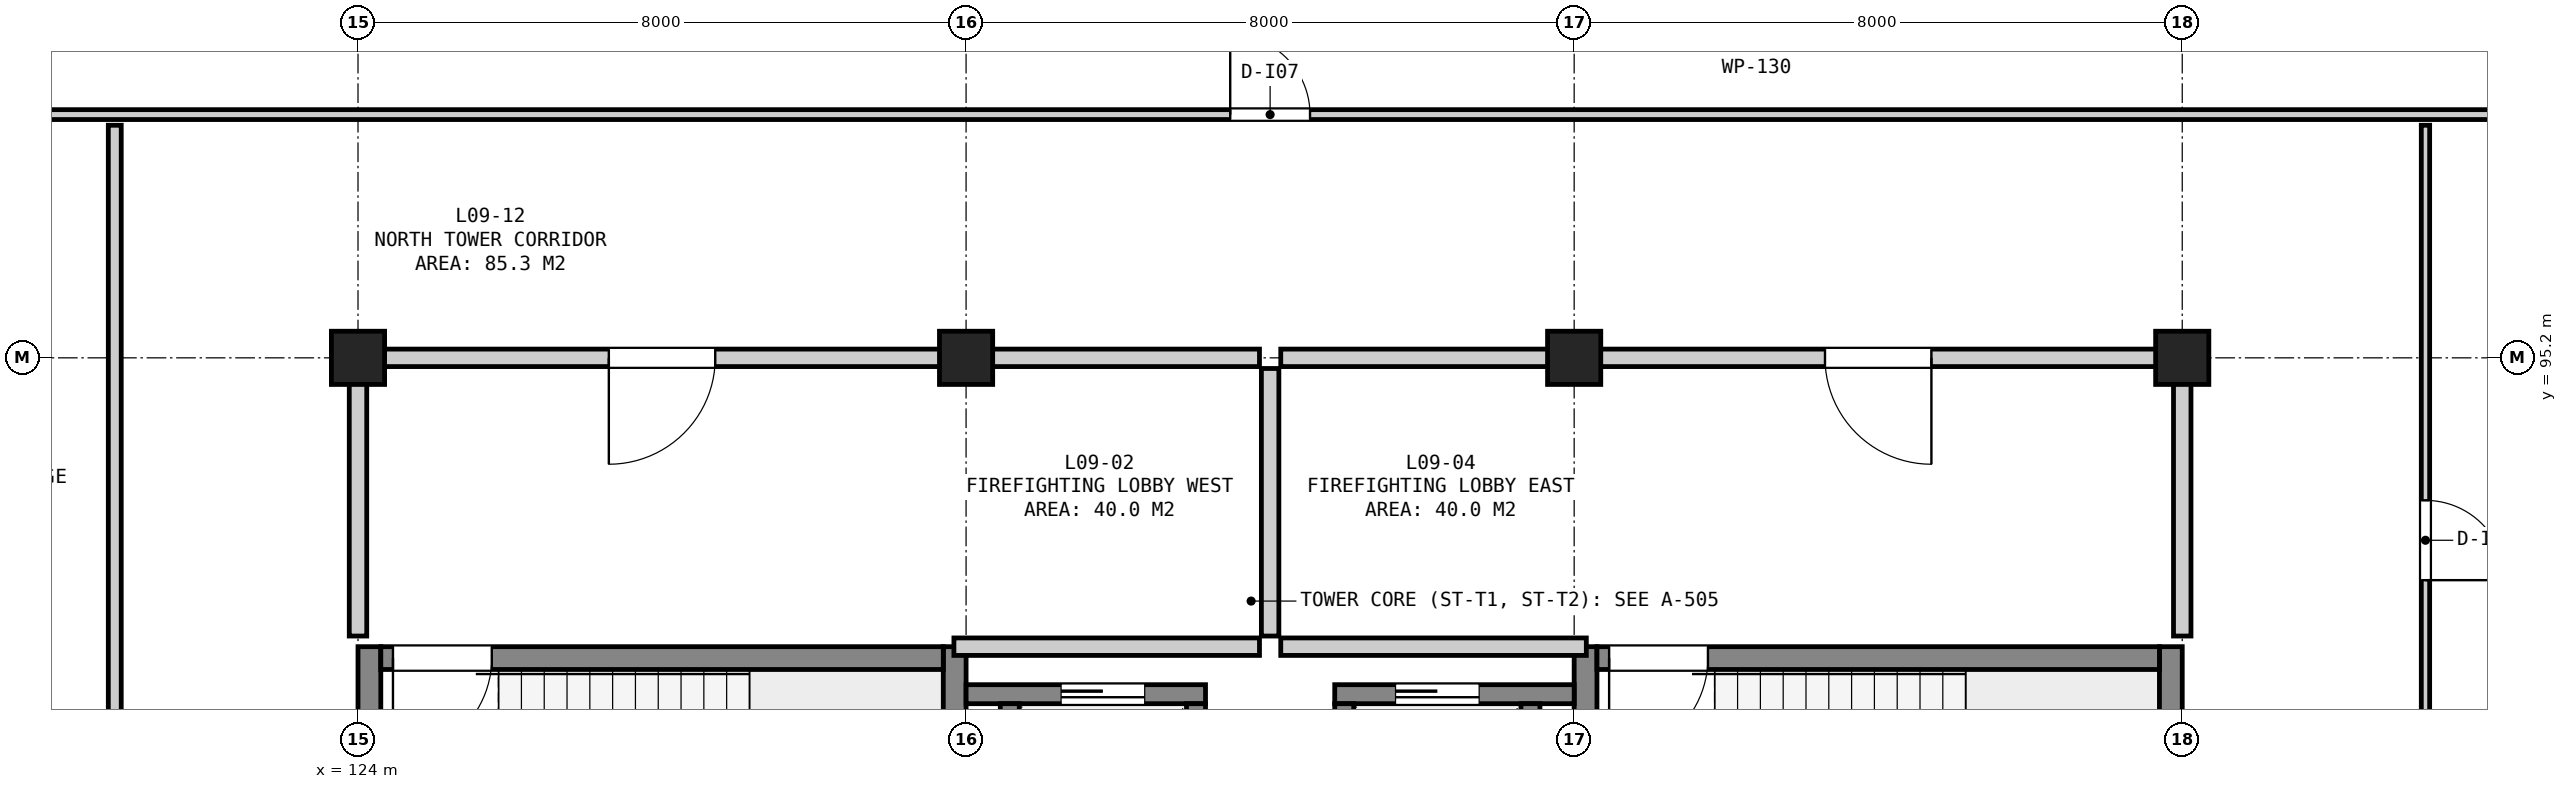
"""IFC4 building model, lengths in metres.
Left out: names, types, materials, properties, quantities, classifications, styles, units other than length and angle.
Written with IfcOpenShell. Run it as: python <this file> out.ifc"""

import sys

from ifc_helpers import new_model, si_unit, direction, frame, frame_2d, origin, origin_2d, place, context, subcontext, project, spatial, rectangle, extrude, element, fill, save


model = new_model("IFC4")
c1 = context("Model", 3, precision=1e-05, world=origin(), true_north=direction((0.0, 1.0)))
c2 = subcontext(c1, "Body", "Model", "MODEL_VIEW")
j1 = project(units=[si_unit("LENGTHUNIT", "METRE"), si_unit("PLANEANGLEUNIT", "RADIAN")], contexts=[c1])
p1 = place(None, origin())
s1 = spatial("IfcSite", under=j1, at=p1, CompositionType="ELEMENT")
p2 = place(p1, origin())
s2 = spatial("IfcBuilding", under=s1, at=p2, CompositionType="ELEMENT")
p3 = place(p2, frame((0.0, 0.0, 39.5)))
s3 = spatial("IfcBuildingStorey", under=s2, at=p3, CompositionType="ELEMENT", Elevation=39.5)
for number, where, z_axis, x_axis in (
    (1, (124.0, 95.2, 0.0), (0.0, 0.0, 1.0), (1.0, 0.0, 0.0)),
    (2, (132.0, 95.2, 0.0), (0.0, 0.0, 1.0), (1.0, 0.0, 0.0)),
    (3, (140.0, 95.2, 0.0), (0.0, 0.0, 1.0), (1.0, 0.0, 0.0)),
    (4, (148.0, 95.2, 0.0), (0.0, 0.0, 1.0), (1.0, 0.0, 0.0)),
):
    element("IfcColumn", number, at=place(p3, frame(where, z_axis=z_axis, x_axis=x_axis)), inside=s3, PredefinedType="COLUMN", context=c2, shape_type="SweptSolid", body=[
        extrude(rectangle(XDim=0.7, YDim=0.7, at=origin_2d()), origin(), (0.0, 0.0, 1.0), 3.8),
    ])
for number, where, z_axis, x_axis in (
    (5, (124.15, 87.2, 0.0), (0.0, 0.0, 1.0), (0.0, 1.0, 0.0)),
    (6, (131.85, 87.2, 0.0), (0.0, 0.0, 1.0), (0.0, 1.0, 0.0)),
):
    element("IfcWall", number, at=place(p3, frame(where, z_axis=z_axis, x_axis=x_axis)), inside=s3, PredefinedType="SHEAR", context=c2, shape_type="SweptSolid", body=[
        extrude(rectangle(XDim=4.2, YDim=0.3, at=frame_2d((2.1, 0.0))), origin(), (0.0, 0.0, 1.0), 3.52),
    ])
p4 = place(p3, frame((124.3, 91.25, 0.0), z_axis=(0.0, 0.0, 1.0), x_axis=(1.0, 0.0, 0.0)))
e7 = element("IfcWall", 7, at=p4, inside=s3, PredefinedType="SHEAR", context=c2, shape_type="SweptSolid", body=[
    extrude(rectangle(XDim=7.4, YDim=0.3, at=frame_2d((3.7, 0.0))), origin(), (0.0, 0.0, 1.0), 3.52),
])
p5 = place(p4, frame((0.16, 0.0, 0.0)))
e8 = element("IfcOpeningElement", 8, at=p5, cuts=e7, PredefinedType="OPENING", context=c2, shape_type="SweptSolid", body=[
    extrude(rectangle(XDim=1.3, YDim=2.18, at=frame_2d((0.65, 1.09))), frame((0.0, 0.162, 0.0), z_axis=(0.0, -1.0, 0.0), x_axis=(1.0, 0.0, 0.0)), (0.0, 0.0, 1.0), 0.324),
])
for number, where, z_axis, x_axis in (
    (9, (140.15, 87.2, 0.0), (0.0, 0.0, 1.0), (0.0, 1.0, 0.0)),
    (10, (147.85, 87.2, 0.0), (0.0, 0.0, 1.0), (0.0, 1.0, 0.0)),
):
    element("IfcWall", number, at=place(p3, frame(where, z_axis=z_axis, x_axis=x_axis)), inside=s3, PredefinedType="SHEAR", context=c2, shape_type="SweptSolid", body=[
        extrude(rectangle(XDim=4.2, YDim=0.3, at=frame_2d((2.1, 0.0))), origin(), (0.0, 0.0, 1.0), 3.52),
    ])
p6 = place(p3, frame((140.3, 91.25, 0.0), z_axis=(0.0, 0.0, 1.0), x_axis=(1.0, 0.0, 0.0)))
e11 = element("IfcWall", 11, at=p6, inside=s3, PredefinedType="SHEAR", context=c2, shape_type="SweptSolid", body=[
    extrude(rectangle(XDim=7.4, YDim=0.3, at=frame_2d((3.7, 0.0))), origin(), (0.0, 0.0, 1.0), 3.52),
])
p7 = place(p6, frame((0.16, 0.0, 0.0)))
e12 = element("IfcOpeningElement", 12, at=p7, cuts=e11, PredefinedType="OPENING", context=c2, shape_type="SweptSolid", body=[
    extrude(rectangle(XDim=1.3, YDim=2.18, at=frame_2d((0.65, 1.09))), frame((0.0, 0.162, 0.0), z_axis=(0.0, -1.0, 0.0), x_axis=(1.0, 0.0, 0.0)), (0.0, 0.0, 1.0), 0.324),
])
p8 = place(p3, frame((132.0, 90.775, 0.0), z_axis=(0.0, 0.0, 1.0), x_axis=(1.0, 0.0, 0.0)))
e13 = element("IfcWall", 13, at=p8, inside=s3, PredefinedType="SHEAR", context=c2, shape_type="SweptSolid", body=[
    extrude(rectangle(XDim=3.15, YDim=0.25, at=frame_2d((1.575, 0.0))), origin(), (0.0, 0.0, 1.0), 3.52),
])
p9 = place(p8, frame((1.25, 0.0, 0.0)))
e14 = element("IfcOpeningElement", 14, at=p9, cuts=e13, PredefinedType="OPENING", context=c2, shape_type="SweptSolid", body=[
    extrude(rectangle(XDim=1.1, YDim=2.15, at=frame_2d((0.55, 1.075))), frame((0.0, 0.137, 0.0), z_axis=(0.0, -1.0, 0.0), x_axis=(1.0, 0.0, 0.0)), (0.0, 0.0, 1.0), 0.274),
])
for number, where, z_axis, x_axis in (
    (15, (132.575, 87.75, 0.0), (0.0, 0.0, 1.0), (0.0, 1.0, 0.0)),
    (16, (135.025, 87.75, 0.0), (0.0, 0.0, 1.0), (0.0, 1.0, 0.0)),
):
    element("IfcWall", number, at=place(p3, frame(where, z_axis=z_axis, x_axis=x_axis)), inside=s3, PredefinedType="SHEAR", context=c2, shape_type="SweptSolid", body=[
        extrude(rectangle(XDim=2.9, YDim=0.25, at=frame_2d((1.45, 0.0))), origin(), (0.0, 0.0, 1.0), 3.52),
    ])
p10 = place(p3, frame((136.85, 90.775, 0.0), z_axis=(0.0, 0.0, 1.0), x_axis=(1.0, 0.0, 0.0)))
e17 = element("IfcWall", 17, at=p10, inside=s3, PredefinedType="SHEAR", context=c2, shape_type="SweptSolid", body=[
    extrude(rectangle(XDim=3.15, YDim=0.25, at=frame_2d((1.575, 0.0))), origin(), (0.0, 0.0, 1.0), 3.52),
])
p11 = place(p10, frame((0.8, 0.0, 0.0)))
e18 = element("IfcOpeningElement", 18, at=p11, cuts=e17, PredefinedType="OPENING", context=c2, shape_type="SweptSolid", body=[
    extrude(rectangle(XDim=1.1, YDim=2.15, at=frame_2d((0.55, 1.075))), frame((0.0, 0.137, 0.0), z_axis=(0.0, -1.0, 0.0), x_axis=(1.0, 0.0, 0.0)), (0.0, 0.0, 1.0), 0.274),
])
for number, where, z_axis, x_axis in (
    (19, (136.975, 87.75, 0.0), (0.0, 0.0, 1.0), (0.0, 1.0, 0.0)),
    (20, (139.425, 87.75, 0.0), (0.0, 0.0, 1.0), (0.0, 1.0, 0.0)),
):
    element("IfcWall", number, at=place(p3, frame(where, z_axis=z_axis, x_axis=x_axis)), inside=s3, PredefinedType="SHEAR", context=c2, shape_type="SweptSolid", body=[
        extrude(rectangle(XDim=2.9, YDim=0.25, at=frame_2d((1.45, 0.0))), origin(), (0.0, 0.0, 1.0), 3.52),
    ])
p12 = place(p3, frame((131.84, 91.4, 0.0), z_axis=(0.0, 0.0, 1.0), x_axis=(1.0, 0.0, 0.0)))
e21 = element("IfcWall", 21, at=p12, inside=s3, PredefinedType="SOLIDWALL", context=c2, shape_type="SweptSolid", body=[
    extrude(rectangle(XDim=4.02, YDim=0.23, at=frame_2d((2.01, 0.0))), origin(), (0.0, 0.0, 1.0), 3.52),
])
p13 = place(p3, frame((124.14, 95.2, 0.0), z_axis=(0.0, 0.0, 1.0), x_axis=(1.0, 0.0, 0.0)))
e22 = element("IfcWall", 22, at=p13, inside=s3, PredefinedType="SOLIDWALL", context=c2, shape_type="SweptSolid", body=[
    extrude(rectangle(XDim=11.72, YDim=0.23, at=frame_2d((5.86, 0.0))), origin(), (0.0, 0.0, 1.0), 2.985),
])
p14 = place(p13, frame((3.16, 0.0, 0.0)))
e23 = element("IfcOpeningElement", 23, at=p14, cuts=e22, PredefinedType="OPENING", context=c2, shape_type="SweptSolid", body=[
    extrude(rectangle(XDim=1.4, YDim=2.2, at=frame_2d((0.7, 1.1))), frame((0.0, 0.127, 0.0), z_axis=(0.0, -1.0, 0.0), x_axis=(1.0, 0.0, 0.0)), (0.0, 0.0, 1.0), 0.254),
])
p15 = place(p3, frame((124.0, 91.54, 0.0), z_axis=(0.0, 0.0, 1.0), x_axis=(0.0, 1.0, 0.0)))
e24 = element("IfcWall", 24, at=p15, inside=s3, PredefinedType="SOLIDWALL", context=c2, shape_type="SweptSolid", body=[
    extrude(rectangle(XDim=3.52, YDim=0.23, at=frame_2d((1.76, 0.0))), origin(), (0.0, 0.0, 1.0), 3.085),
])
p16 = place(p3, frame((136.0, 91.54, 0.0), z_axis=(0.0, 0.0, 1.0), x_axis=(0.0, 1.0, 0.0)))
e25 = element("IfcWall", 25, at=p16, inside=s3, PredefinedType="SOLIDWALL", context=c2, shape_type="SweptSolid", body=[
    extrude(rectangle(XDim=3.52, YDim=0.23, at=frame_2d((1.76, 0.0))), origin(), (0.0, 0.0, 1.0), 3.52),
])
p17 = place(p3, frame((136.14, 91.4, 0.0), z_axis=(0.0, 0.0, 1.0), x_axis=(1.0, 0.0, 0.0)))
e26 = element("IfcWall", 26, at=p17, inside=s3, PredefinedType="SOLIDWALL", context=c2, shape_type="SweptSolid", body=[
    extrude(rectangle(XDim=4.02, YDim=0.23, at=frame_2d((2.01, 0.0))), origin(), (0.0, 0.0, 1.0), 3.52),
])
p18 = place(p3, frame((136.14, 95.2, 0.0), z_axis=(0.0, 0.0, 1.0), x_axis=(1.0, 0.0, 0.0)))
e27 = element("IfcWall", 27, at=p18, inside=s3, PredefinedType="SOLIDWALL", context=c2, shape_type="SweptSolid", body=[
    extrude(rectangle(XDim=11.72, YDim=0.23, at=frame_2d((5.86, 0.0))), origin(), (0.0, 0.0, 1.0), 3.035),
])
p19 = place(p18, frame((7.16, 0.0, 0.0)))
e28 = element("IfcOpeningElement", 28, at=p19, cuts=e27, PredefinedType="OPENING", context=c2, shape_type="SweptSolid", body=[
    extrude(rectangle(XDim=1.4, YDim=2.2, at=frame_2d((0.7, 1.1))), frame((0.0, 0.127, 0.0), z_axis=(0.0, -1.0, 0.0), x_axis=(1.0, 0.0, 0.0)), (0.0, 0.0, 1.0), 0.254),
])
p20 = place(p3, frame((148.0, 91.54, 0.0), z_axis=(0.0, 0.0, 1.0), x_axis=(0.0, 1.0, 0.0)))
e29 = element("IfcWall", 29, at=p20, inside=s3, PredefinedType="SOLIDWALL", context=c2, shape_type="SweptSolid", body=[
    extrude(rectangle(XDim=3.52, YDim=0.23, at=frame_2d((1.76, 0.0))), origin(), (0.0, 0.0, 1.0), 2.935),
])
p21 = place(p3, frame((116.895, 98.4, 0.0), z_axis=(0.0, 0.0, 1.0), x_axis=(1.0, 0.0, 0.0)))
e30 = element("IfcWall", 30, at=p21, inside=s3, PredefinedType="PARTITIONING", context=c2, shape_type="SweptSolid", body=[
    extrude(rectangle(XDim=51.01, YDim=0.13, at=frame_2d((25.505, 0.0))), origin(), (0.0, 0.0, 1.0), 3.52),
])
p22 = place(p21, frame((18.58, 0.0, 0.0)))
e31 = element("IfcOpeningElement", 31, at=p22, cuts=e30, PredefinedType="OPENING", context=c2, shape_type="SweptSolid", body=[
    extrude(rectangle(XDim=1.05, YDim=2.15, at=frame_2d((0.525, 1.075))), frame((0.0, 0.077, 0.0), z_axis=(0.0, -1.0, 0.0), x_axis=(1.0, 0.0, 0.0)), (0.0, 0.0, 1.0), 0.154),
])
p23 = place(p3, frame((151.2, 87.34, 0.0), z_axis=(0.0, 0.0, 1.0), x_axis=(0.0, 1.0, 0.0)))
e32 = element("IfcWall", 32, at=p23, inside=s3, PredefinedType="PARTITIONING", context=c2, shape_type="SweptSolid", body=[
    extrude(rectangle(XDim=10.92, YDim=0.11, at=frame_2d((5.46, 0.0))), origin(), (0.0, 0.0, 1.0), 3.52),
])
p24 = place(p23, frame((4.935, 0.0, 0.0)))
e33 = element("IfcOpeningElement", 33, at=p24, cuts=e32, PredefinedType="OPENING", context=c2, shape_type="SweptSolid", body=[
    extrude(rectangle(XDim=1.05, YDim=2.15, at=frame_2d((0.525, 1.075))), frame((0.0, 0.067, 0.0), z_axis=(0.0, -1.0, 0.0), x_axis=(1.0, 0.0, 0.0)), (0.0, 0.0, 1.0), 0.134),
])
p25 = place(p3, frame((120.8, 76.14, 0.0), z_axis=(0.0, 0.0, 1.0), x_axis=(0.0, 1.0, 0.0)))
e34 = element("IfcWall", 34, at=p25, inside=s3, PredefinedType="PARTITIONING", context=c2, shape_type="SweptSolid", body=[
    extrude(rectangle(XDim=22.12, YDim=0.17, at=frame_2d((11.06, 0.0))), origin(), (0.0, 0.0, 1.0), 3.52),
])
p26 = place(p25, frame((6.535, 0.0, 0.0)))
e35 = element("IfcOpeningElement", 35, at=p26, cuts=e34, PredefinedType="OPENING", context=c2, shape_type="SweptSolid", body=[
    extrude(rectangle(XDim=1.05, YDim=2.15, at=frame_2d((0.525, 1.075))), frame((0.0, 0.097, 0.0), z_axis=(0.0, -1.0, 0.0), x_axis=(1.0, 0.0, 0.0)), (0.0, 0.0, 1.0), 0.194),
])
p27 = place(p5, frame((1.3, 0.0, 0.0), z_axis=(0.0, 0.0, 1.0), x_axis=(-1.0, 0.0, 0.0)))
e36 = element("IfcDoor", 36, at=p27, inside=s3, OperationType="SINGLE_SWING_RIGHT", PredefinedType="DOOR", context=c2, shape_type="SweptSolid", body=[
    extrude(rectangle(XDim=1.3, YDim=2.18, at=frame_2d((0.65, 1.09))), frame((0.0, 0.025, 0.0), z_axis=(0.0, -1.0, 0.0), x_axis=(1.0, 0.0, 0.0)), (0.0, 0.0, 1.0), 0.05),
])
fill(e8, e36)
p28 = place(p7, frame((1.3, 0.0, 0.0), z_axis=(0.0, 0.0, 1.0), x_axis=(-1.0, 0.0, 0.0)))
e37 = element("IfcDoor", 37, at=p28, inside=s3, OperationType="SINGLE_SWING_RIGHT", PredefinedType="DOOR", context=c2, shape_type="SweptSolid", body=[
    extrude(rectangle(XDim=1.3, YDim=2.18, at=frame_2d((0.65, 1.09))), frame((0.0, 0.025, 0.0), z_axis=(0.0, -1.0, 0.0), x_axis=(1.0, 0.0, 0.0)), (0.0, 0.0, 1.0), 0.05),
])
fill(e12, e37)
p29 = place(p9, origin())
e38 = element("IfcDoor", 38, at=p29, inside=s3, OperationType="SLIDING_TO_LEFT", PredefinedType="DOOR", context=c2, shape_type="SweptSolid", body=[
    extrude(rectangle(XDim=1.1, YDim=2.15, at=frame_2d((0.55, 1.075))), frame((0.0, 0.025, 0.0), z_axis=(0.0, -1.0, 0.0), x_axis=(1.0, 0.0, 0.0)), (0.0, 0.0, 1.0), 0.05),
])
fill(e14, e38)
p30 = place(p11, origin())
e39 = element("IfcDoor", 39, at=p30, inside=s3, OperationType="SLIDING_TO_LEFT", PredefinedType="DOOR", context=c2, shape_type="SweptSolid", body=[
    extrude(rectangle(XDim=1.1, YDim=2.15, at=frame_2d((0.55, 1.075))), frame((0.0, 0.025, 0.0), z_axis=(0.0, -1.0, 0.0), x_axis=(1.0, 0.0, 0.0)), (0.0, 0.0, 1.0), 0.05),
])
fill(e18, e39)
p31 = place(p14, frame((1.4, 0.0, 0.0), z_axis=(0.0, 0.0, 1.0), x_axis=(-1.0, 0.0, 0.0)))
e40 = element("IfcDoor", 40, at=p31, inside=s3, OperationType="SINGLE_SWING_RIGHT", PredefinedType="DOOR", context=c2, shape_type="SweptSolid", body=[
    extrude(rectangle(XDim=1.4, YDim=2.2, at=frame_2d((0.7, 1.1))), frame((0.0, 0.025, 0.0), z_axis=(0.0, -1.0, 0.0), x_axis=(1.0, 0.0, 0.0)), (0.0, 0.0, 1.0), 0.05),
])
fill(e23, e40)
p32 = place(p19, frame((1.4, 0.0, 0.0), z_axis=(0.0, 0.0, 1.0), x_axis=(-1.0, 0.0, 0.0)))
e41 = element("IfcDoor", 41, at=p32, inside=s3, OperationType="SINGLE_SWING_LEFT", PredefinedType="DOOR", context=c2, shape_type="SweptSolid", body=[
    extrude(rectangle(XDim=1.4, YDim=2.2, at=frame_2d((0.7, 1.1))), frame((0.0, 0.025, 0.0), z_axis=(0.0, -1.0, 0.0), x_axis=(1.0, 0.0, 0.0)), (0.0, 0.0, 1.0), 0.05),
])
fill(e28, e41)
p33 = place(p22, origin())
e42 = element("IfcDoor", 42, at=p33, inside=s3, OperationType="SINGLE_SWING_LEFT", PredefinedType="DOOR", context=c2, shape_type="SweptSolid", body=[
    extrude(rectangle(XDim=1.05, YDim=2.15, at=frame_2d((0.525, 1.075))), frame((0.0, 0.025, 0.0), z_axis=(0.0, -1.0, 0.0), x_axis=(1.0, 0.0, 0.0)), (0.0, 0.0, 1.0), 0.05),
])
fill(e31, e42)
p34 = place(p24, frame((1.05, 0.0, 0.0), z_axis=(0.0, 0.0, 1.0), x_axis=(-1.0, 0.0, 0.0)))
e43 = element("IfcDoor", 43, at=p34, inside=s3, OperationType="SINGLE_SWING_RIGHT", PredefinedType="DOOR", context=c2, shape_type="SweptSolid", body=[
    extrude(rectangle(XDim=1.05, YDim=2.15, at=frame_2d((0.525, 1.075))), frame((0.0, 0.025, 0.0), z_axis=(0.0, -1.0, 0.0), x_axis=(1.0, 0.0, 0.0)), (0.0, 0.0, 1.0), 0.05),
])
fill(e33, e43)
save(model, sys.argv[1])
